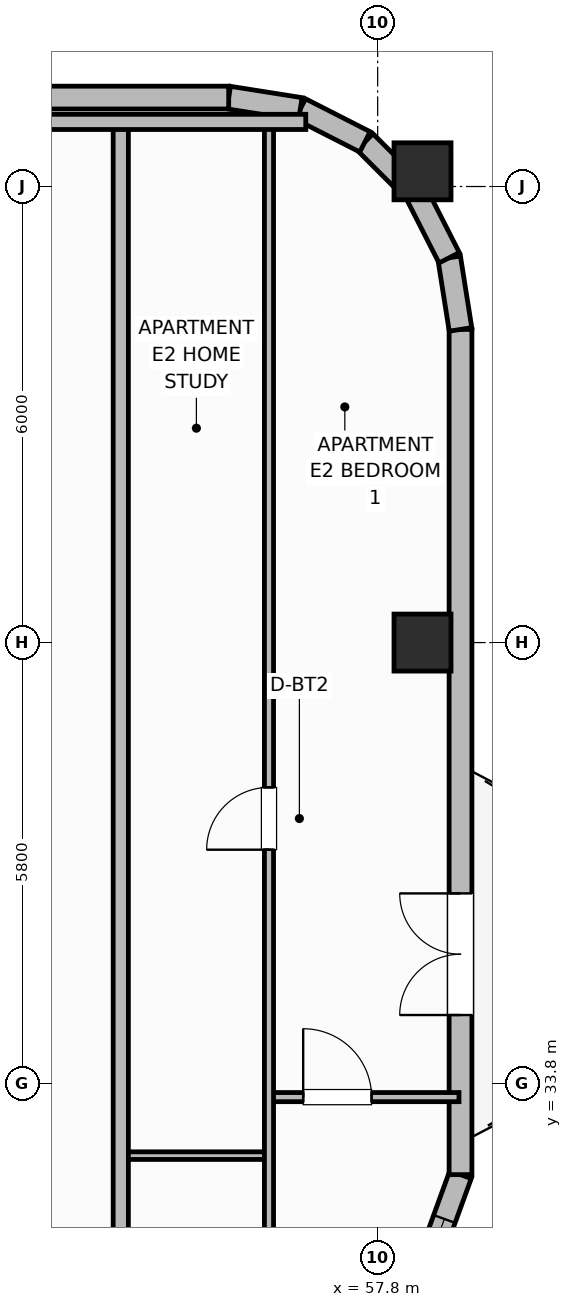
"""IFC4 building model, lengths in metres.
Left out: names, types, materials, properties, quantities, classifications, styles, units other than length and angle.
Written with IfcOpenShell. Run it as: python <this file> out.ifc"""

import sys

from ifc_helpers import new_model, si_unit, direction, frame, frame_2d, origin, origin_2d, place, context, subcontext, project, spatial, rectangle, extrude, element, fill, save


model = new_model("IFC4")
c1 = context("Model", 3, precision=1e-05, world=origin(), true_north=direction((0.0, 1.0)))
c2 = subcontext(c1, "Body", "Model", "MODEL_VIEW")
j1 = project(units=[si_unit("LENGTHUNIT", "METRE"), si_unit("PLANEANGLEUNIT", "RADIAN")], contexts=[c1])
p1 = place(None, origin())
s1 = spatial("IfcSite", under=j1, at=p1, CompositionType="ELEMENT")
p2 = place(p1, origin())
s2 = spatial("IfcBuilding", under=s1, at=p2, CompositionType="ELEMENT")
p3 = place(p2, frame((0.0, 0.0, 267.6)))
s3 = spatial("IfcBuildingStorey", under=s2, at=p3, CompositionType="ELEMENT", Elevation=267.6)
for number, where, z_axis, x_axis in (
    (1, (58.39, 39.6, 0.0), (0.0, 0.0, 1.0), (1.0, 0.0, 0.0)),
    (2, (58.39, 45.8, 0.0), (0.0, 0.0, 1.0), (1.0, 0.0, 0.0)),
):
    element("IfcColumn", number, at=place(p3, frame(where, z_axis=z_axis, x_axis=x_axis)), inside=s3, PredefinedType="COLUMN", context=c2, shape_type="SweptSolid", body=[
        extrude(rectangle(XDim=0.75, YDim=0.75, at=origin_2d()), origin(), (0.0, 0.0, 1.0), 3.7),
    ])
p4 = place(p3, frame((58.09, 30.4, 0.0), z_axis=(0.0, 0.0, 1.0), x_axis=(0.341642580708, 0.939829956453, 0.0)))
e3 = element("IfcWall", 3, at=p4, inside=s3, PredefinedType="SOLIDWALL", context=c2, shape_type="SweptSolid", body=[
    extrude(rectangle(XDim=2.341, YDim=0.3, at=frame_2d((1.17, 0.0))), origin(), (0.0, 0.0, 1.0), 2.73),
])
p5 = place(p4, frame((0.621, 0.0, 0.92)))
e4 = element("IfcOpeningElement", 4, at=p5, cuts=e3, PredefinedType="OPENING", context=c2, shape_type="SweptSolid", body=[
    extrude(rectangle(XDim=1.1, YDim=1.65, at=frame_2d((0.55, 0.825))), frame((0.0, 0.16, 0.0), z_axis=(0.0, -1.0, 0.0), x_axis=(1.0, 0.0, 0.0)), (0.0, 0.0, 1.0), 0.32),
])
p6 = place(p3, frame((58.89, 32.6, 0.0), z_axis=(0.0, 0.0, 1.0), x_axis=(0.0, 1.0, 0.0)))
e5 = element("IfcWall", 5, at=p6, inside=s3, PredefinedType="SOLIDWALL", context=c2, shape_type="SweptSolid", body=[
    extrude(rectangle(XDim=11.12, YDim=0.3, at=frame_2d((5.56, 0.0))), origin(), (0.0, 0.0, 1.0), 2.73),
])
p7 = place(p6, frame((2.1, 0.0, 0.0)))
e6 = element("IfcOpeningElement", 6, at=p7, cuts=e5, PredefinedType="OPENING", context=c2, shape_type="SweptSolid", body=[
    extrude(rectangle(XDim=1.6, YDim=2.1, at=frame_2d((0.8, 1.05))), frame((0.0, 0.16, 0.0), z_axis=(0.0, -1.0, 0.0), x_axis=(1.0, 0.0, 0.0)), (0.0, 0.0, 1.0), 0.32),
])
p8 = place(p3, frame((58.89, 43.72, 0.0), z_axis=(0.0, 0.0, 1.0), x_axis=(-0.156304114255, 0.987708977314, 0.0)))
e7 = element("IfcWall", 7, at=p8, inside=s3, PredefinedType="SOLIDWALL", context=c2, shape_type="SweptSolid", body=[
    extrude(rectangle(XDim=0.954, YDim=0.3, at=frame_2d((0.477, 0.0))), origin(), (0.0, 0.0, 1.0), 2.73),
])
p9 = place(p3, frame((58.741, 44.663, 0.0), z_axis=(0.0, 0.0, 1.0), x_axis=(-0.45395644796, 0.891023873617, 0.0)))
e8 = element("IfcWall", 8, at=p9, inside=s3, PredefinedType="SOLIDWALL", context=c2, shape_type="SweptSolid", body=[
    extrude(rectangle(XDim=0.954, YDim=0.3, at=frame_2d((0.477, 0.0))), origin(), (0.0, 0.0, 1.0), 2.73),
])
for number, where, z_axis, x_axis in (
    (9, (58.308, 45.513, 0.0), (0.0, 0.0, 1.0), (-0.707, 0.707, 0.0)),
    (10, (57.633, 46.188, 0.0), (0.0, 0.0, 1.0), (-0.891, 0.454, 0.0)),
):
    element("IfcWall", number, at=place(p3, frame(where, z_axis=z_axis, x_axis=x_axis)), inside=s3, PredefinedType="SOLIDWALL", context=c2, shape_type="SweptSolid", body=[
        extrude(rectangle(XDim=0.954, YDim=0.3, at=frame_2d((0.477, 0.0))), origin(), (0.0, 0.0, 1.0), 2.73),
    ])
p10 = place(p3, frame((56.782, 46.621, 0.0), z_axis=(0.0, 0.0, 1.0), x_axis=(-0.987663181641, 0.156593229835, 0.0)))
e11 = element("IfcWall", 11, at=p10, inside=s3, PredefinedType="SOLIDWALL", context=c2, shape_type="SweptSolid", body=[
    extrude(rectangle(XDim=0.954, YDim=0.3, at=frame_2d((0.477, 0.0))), origin(), (0.0, 0.0, 1.0), 2.73),
])
p11 = place(p3, frame((55.84, 46.77, 0.0), z_axis=(0.0, 0.0, 1.0), x_axis=(-1.0, 0.0, 0.0)))
e12 = element("IfcWall", 12, at=p11, inside=s3, PredefinedType="SOLIDWALL", context=c2, shape_type="SweptSolid", body=[
    extrude(rectangle(XDim=33.28, YDim=0.3, at=frame_2d((16.64, 0.0))), origin(), (0.0, 0.0, 1.0), 2.73),
])
p12 = place(p11, frame((4.547, 0.0, 0.76)))
e13 = element("IfcOpeningElement", 13, at=p12, cuts=e12, PredefinedType="OPENING", context=c2, shape_type="SweptSolid", body=[
    extrude(rectangle(XDim=1.8, YDim=1.85, at=frame_2d((0.9, 0.925))), frame((0.0, 0.16, 0.0), z_axis=(0.0, -1.0, 0.0), x_axis=(1.0, 0.0, 0.0)), (0.0, 0.0, 1.0), 0.32),
])
p13 = place(p11, frame((7.745, 0.0, 0.76)))
e14 = element("IfcOpeningElement", 14, at=p13, cuts=e12, PredefinedType="OPENING", context=c2, shape_type="SweptSolid", body=[
    extrude(rectangle(XDim=1.8, YDim=1.85, at=frame_2d((0.9, 0.925))), frame((0.0, 0.16, 0.0), z_axis=(0.0, -1.0, 0.0), x_axis=(1.0, 0.0, 0.0)), (0.0, 0.0, 1.0), 0.32),
])
p14 = place(p11, frame((14.141, 0.0, 0.76)))
e15 = element("IfcOpeningElement", 15, at=p14, cuts=e12, PredefinedType="OPENING", context=c2, shape_type="SweptSolid", body=[
    extrude(rectangle(XDim=1.8, YDim=1.85, at=frame_2d((0.9, 0.925))), frame((0.0, 0.16, 0.0), z_axis=(0.0, -1.0, 0.0), x_axis=(1.0, 0.0, 0.0)), (0.0, 0.0, 1.0), 0.32),
])
p15 = place(p11, frame((17.339, 0.0, 0.76)))
e16 = element("IfcOpeningElement", 16, at=p15, cuts=e12, PredefinedType="OPENING", context=c2, shape_type="SweptSolid", body=[
    extrude(rectangle(XDim=1.8, YDim=1.85, at=frame_2d((0.9, 0.925))), frame((0.0, 0.16, 0.0), z_axis=(0.0, -1.0, 0.0), x_axis=(1.0, 0.0, 0.0)), (0.0, 0.0, 1.0), 0.32),
])
p16 = place(p11, frame((23.735, 0.0, 0.76)))
e17 = element("IfcOpeningElement", 17, at=p16, cuts=e12, PredefinedType="OPENING", context=c2, shape_type="SweptSolid", body=[
    extrude(rectangle(XDim=1.8, YDim=1.85, at=frame_2d((0.9, 0.925))), frame((0.0, 0.16, 0.0), z_axis=(0.0, -1.0, 0.0), x_axis=(1.0, 0.0, 0.0)), (0.0, 0.0, 1.0), 0.32),
])
p17 = place(p11, frame((26.933, 0.0, 0.76)))
e18 = element("IfcOpeningElement", 18, at=p17, cuts=e12, PredefinedType="OPENING", context=c2, shape_type="SweptSolid", body=[
    extrude(rectangle(XDim=1.8, YDim=1.85, at=frame_2d((0.9, 0.925))), frame((0.0, 0.16, 0.0), z_axis=(0.0, -1.0, 0.0), x_axis=(1.0, 0.0, 0.0)), (0.0, 0.0, 1.0), 0.32),
])
p18 = place(p3, frame((54.42, 32.85, 0.0), z_axis=(0.0, 0.0, 1.0), x_axis=(1.0, 0.0, 0.0)))
e19 = element("IfcWall", 19, at=p18, inside=s3, PredefinedType="PARTITIONING", context=c2, shape_type="SweptSolid", body=[
    extrude(rectangle(XDim=1.95, YDim=0.1, at=frame_2d((0.975, 0.0))), origin(), (0.0, 0.0, 1.0), 2.56),
])
p19 = place(p3, frame((56.37, 33.62, 0.0), z_axis=(0.0, 0.0, 1.0), x_axis=(1.0, 0.0, 0.0)))
e20 = element("IfcWall", 20, at=p19, inside=s3, PredefinedType="PARTITIONING", context=c2, shape_type="SweptSolid", body=[
    extrude(rectangle(XDim=2.5, YDim=0.12, at=frame_2d((1.25, 0.0))), origin(), (0.0, 0.0, 1.0), 2.56),
])
p20 = place(p19, frame((0.45, 0.0, 0.0)))
e21 = element("IfcOpeningElement", 21, at=p20, cuts=e20, PredefinedType="OPENING", context=c2, shape_type="SweptSolid", body=[
    extrude(rectangle(XDim=0.9, YDim=2.1, at=frame_2d((0.45, 1.05))), frame((0.0, 0.07, 0.0), z_axis=(0.0, -1.0, 0.0), x_axis=(1.0, 0.0, 0.0)), (0.0, 0.0, 1.0), 0.14),
])
p21 = place(p3, frame((56.37, 23.69, 0.0), z_axis=(0.0, 0.0, 1.0), x_axis=(0.0, 1.0, 0.0)))
e22 = element("IfcWall", 22, at=p21, inside=s3, PredefinedType="PARTITIONING", context=c2, shape_type="SweptSolid", body=[
    extrude(rectangle(XDim=22.72, YDim=0.12, at=frame_2d((11.36, 0.0))), origin(), (0.0, 0.0, 1.0), 2.56),
])
p22 = place(p21, frame((0.41, 0.0, 0.0)))
e23 = element("IfcOpeningElement", 23, at=p22, cuts=e22, PredefinedType="OPENING", context=c2, shape_type="SweptSolid", body=[
    extrude(rectangle(XDim=0.9, YDim=2.1, at=frame_2d((0.45, 1.05))), frame((0.0, 0.07, 0.0), z_axis=(0.0, -1.0, 0.0), x_axis=(1.0, 0.0, 0.0)), (0.0, 0.0, 1.0), 0.14),
])
p23 = place(p21, frame((13.185, 0.0, 0.0)))
e24 = element("IfcOpeningElement", 24, at=p23, cuts=e22, PredefinedType="OPENING", context=c2, shape_type="SweptSolid", body=[
    extrude(rectangle(XDim=0.82, YDim=2.08, at=frame_2d((0.41, 1.04))), frame((0.0, 0.07, 0.0), z_axis=(0.0, -1.0, 0.0), x_axis=(1.0, 0.0, 0.0)), (0.0, 0.0, 1.0), 0.14),
])
p24 = place(p3, frame((54.42, 9.95, 0.0), z_axis=(0.0, 0.0, 1.0), x_axis=(0.0, 1.0, 0.0)))
e25 = element("IfcWall", 25, at=p24, inside=s3, PredefinedType="PARTITIONING", context=c2, shape_type="SweptSolid", body=[
    extrude(rectangle(XDim=36.5, YDim=0.2, at=frame_2d((18.25, 0.0))), origin(), (0.0, 0.0, 1.0), 2.56),
])
p25 = place(p24, frame((3.25, 0.0, 0.0)))
e26 = element("IfcOpeningElement", 26, at=p25, cuts=e25, PredefinedType="OPENING", context=c2, shape_type="SweptSolid", body=[
    extrude(rectangle(XDim=1.0, YDim=2.15, at=frame_2d((0.5, 1.075))), frame((0.0, 0.11, 0.0), z_axis=(0.0, -1.0, 0.0), x_axis=(1.0, 0.0, 0.0)), (0.0, 0.0, 1.0), 0.22),
])
p26 = place(p24, frame((14.25, 0.0, 0.0)))
e27 = element("IfcOpeningElement", 27, at=p26, cuts=e25, PredefinedType="OPENING", context=c2, shape_type="SweptSolid", body=[
    extrude(rectangle(XDim=1.0, YDim=2.15, at=frame_2d((0.5, 1.075))), frame((0.0, 0.11, 0.0), z_axis=(0.0, -1.0, 0.0), x_axis=(1.0, 0.0, 0.0)), (0.0, 0.0, 1.0), 0.22),
])
p27 = place(p3, frame((53.1, 46.45, 0.0), z_axis=(0.0, 0.0, 1.0), x_axis=(1.0, 0.0, 0.0)))
e28 = element("IfcWall", 28, at=p27, inside=s3, PredefinedType="PARTITIONING", context=c2, shape_type="SweptSolid", body=[
    extrude(rectangle(XDim=3.754, YDim=0.2, at=frame_2d((1.877, 0.0))), origin(), (0.0, 0.0, 1.0), 2.56),
])
p28 = place(p5, origin())
e29 = element("IfcWindow", 29, at=p28, inside=s3, PartitioningType="SINGLE_PANEL", PredefinedType="WINDOW", context=c2, shape_type="SweptSolid", body=[
    extrude(rectangle(XDim=1.1, YDim=1.65, at=frame_2d((0.55, 0.825))), frame((0.0, 0.03, 0.0), z_axis=(0.0, -1.0, 0.0), x_axis=(1.0, 0.0, 0.0)), (0.0, 0.0, 1.0), 0.06),
])
fill(e4, e29)
p29 = place(p7, origin())
e30 = element("IfcDoor", 30, at=p29, inside=s3, OperationType="DOUBLE_DOOR_SINGLE_SWING", PredefinedType="DOOR", context=c2, shape_type="SweptSolid", body=[
    extrude(rectangle(XDim=1.6, YDim=2.1, at=frame_2d((0.8, 1.05))), frame((0.0, 0.025, 0.0), z_axis=(0.0, -1.0, 0.0), x_axis=(1.0, 0.0, 0.0)), (0.0, 0.0, 1.0), 0.05),
])
fill(e6, e30)
p30 = place(p20, origin())
e31 = element("IfcDoor", 31, at=p30, inside=s3, OperationType="SINGLE_SWING_LEFT", PredefinedType="DOOR", context=c2, shape_type="SweptSolid", body=[
    extrude(rectangle(XDim=0.9, YDim=2.1, at=frame_2d((0.45, 1.05))), frame((0.0, 0.025, 0.0), z_axis=(0.0, -1.0, 0.0), x_axis=(1.0, 0.0, 0.0)), (0.0, 0.0, 1.0), 0.05),
])
fill(e21, e31)
p31 = place(p23, origin())
e32 = element("IfcDoor", 32, at=p31, inside=s3, OperationType="SINGLE_SWING_LEFT", PredefinedType="DOOR", context=c2, shape_type="SweptSolid", body=[
    extrude(rectangle(XDim=0.82, YDim=2.08, at=frame_2d((0.41, 1.04))), frame((0.0, 0.025, 0.0), z_axis=(0.0, -1.0, 0.0), x_axis=(1.0, 0.0, 0.0)), (0.0, 0.0, 1.0), 0.05),
])
fill(e24, e32)
save(model, sys.argv[1])
